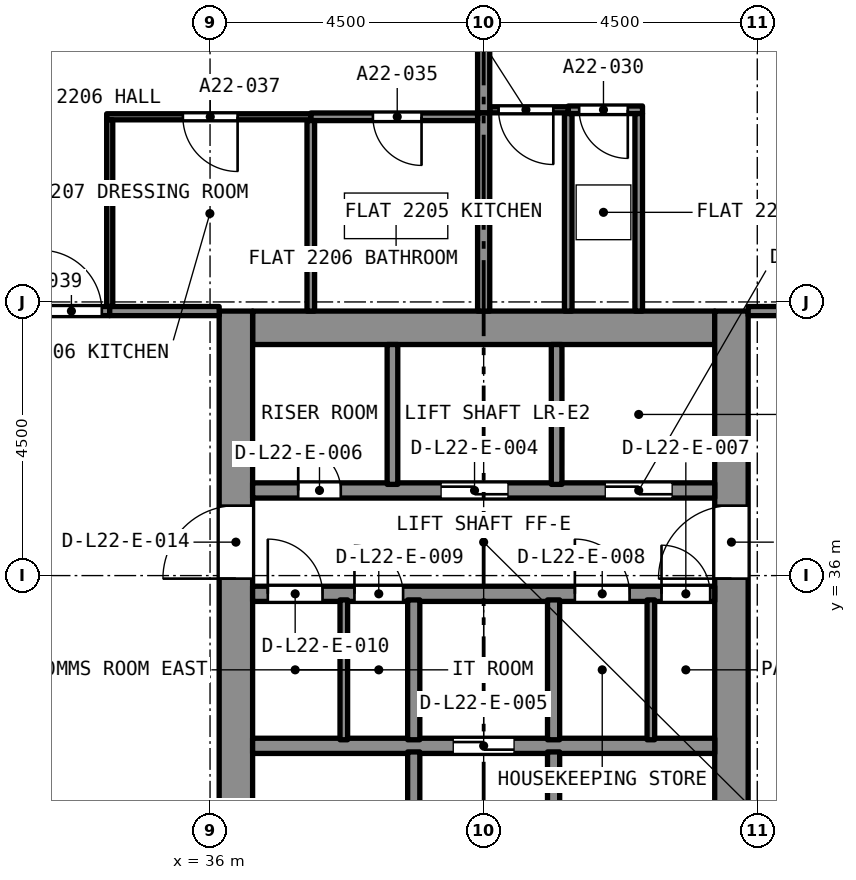
"""IFC4 building model, lengths in metres.
Left out: names, types, materials, properties, quantities, classifications, styles, units other than length and angle.
Written with IfcOpenShell. Run it as: python <this file> out.ifc"""

import sys

from ifc_helpers import new_model, si_unit, direction, frame, frame_2d, origin, place, context, subcontext, project, spatial, rectangle, extrude, element, fill, save


model = new_model("IFC4")
c1 = context("Model", 3, precision=1e-05, world=origin(), true_north=direction((0.0, 1.0)))
c2 = subcontext(c1, "Body", "Model", "MODEL_VIEW")
j1 = project(units=[si_unit("LENGTHUNIT", "METRE"), si_unit("PLANEANGLEUNIT", "RADIAN")], contexts=[c1])
p1 = place(None, origin())
s1 = spatial("IfcSite", under=j1, at=p1, CompositionType="ELEMENT")
p2 = place(p1, origin())
s2 = spatial("IfcBuilding", under=s1, at=p2, CompositionType="ELEMENT")
p3 = place(p2, frame((0.0, 0.0, 83.2)))
s3 = spatial("IfcBuildingStorey", under=s2, at=p3, CompositionType="ELEMENT", Elevation=83.2)
p4 = place(p3, frame((36.7, 40.075, 0.0), z_axis=(0.0, 0.0, 1.0), x_axis=(1.0, 0.0, 0.0)))
e1 = element("IfcWall", 1, at=p4, inside=s3, PredefinedType="SOLIDWALL", context=c2, shape_type="SweptSolid", body=[
    extrude(rectangle(XDim=7.6, YDim=0.55, at=frame_2d((3.8, 0.0))), origin(), (0.0, 0.0, 1.0), 3.2),
])
p5 = place(p3, frame((36.425, 27.15, 0.0), z_axis=(0.0, 0.0, 1.0), x_axis=(0.0, 1.0, 0.0)))
e2 = element("IfcWall", 2, at=p5, inside=s3, PredefinedType="SOLIDWALL", context=c2, shape_type="SweptSolid", body=[
    extrude(rectangle(XDim=13.2, YDim=0.55, at=frame_2d((6.6, 0.0))), origin(), (0.0, 0.0, 1.0), 3.2),
])
p6 = place(p5, frame((8.8, 0.0, 0.0)))
e3 = element("IfcOpeningElement", 3, at=p6, cuts=e2, PredefinedType="OPENING", context=c2, shape_type="SweptSolid", body=[
    extrude(rectangle(XDim=1.2, YDim=2.1, at=frame_2d((0.6, 1.05))), frame((0.0, 0.285, 0.0), z_axis=(0.0, -1.0, 0.0), x_axis=(1.0, 0.0, 0.0)), (0.0, 0.0, 1.0), 0.57),
])
p7 = place(p3, frame((44.575, 27.15, 0.0), z_axis=(0.0, 0.0, 1.0), x_axis=(0.0, 1.0, 0.0)))
e4 = element("IfcWall", 4, at=p7, inside=s3, PredefinedType="SOLIDWALL", context=c2, shape_type="SweptSolid", body=[
    extrude(rectangle(XDim=13.2, YDim=0.55, at=frame_2d((6.6, 0.0))), origin(), (0.0, 0.0, 1.0), 3.2),
])
p8 = place(p7, frame((8.8, 0.0, 0.0)))
e5 = element("IfcOpeningElement", 5, at=p8, cuts=e4, PredefinedType="OPENING", context=c2, shape_type="SweptSolid", body=[
    extrude(rectangle(XDim=1.2, YDim=2.1, at=frame_2d((0.6, 1.05))), frame((0.0, 0.285, 0.0), z_axis=(0.0, -1.0, 0.0), x_axis=(1.0, 0.0, 0.0)), (0.0, 0.0, 1.0), 0.57),
])
p9 = place(p3, frame((43.113, 43.66, 0.0), z_axis=(0.0, 0.0, 1.0), x_axis=(-1.0, 0.0, 0.0)))
e6 = element("IfcWall", 6, at=p9, inside=s3, PredefinedType="PARTITIONING", context=c2, shape_type="SweptSolid", body=[
    extrude(rectangle(XDim=1.222, YDim=0.125, at=frame_2d((0.611, 0.0))), origin(), (0.0, 0.0, 1.0), 2.9),
])
p10 = place(p9, frame((0.242, 0.0, 0.0)))
e7 = element("IfcOpeningElement", 7, at=p10, cuts=e6, PredefinedType="OPENING", context=c2, shape_type="SweptSolid", body=[
    extrude(rectangle(XDim=0.8, YDim=2.1, at=frame_2d((0.4, 1.05))), frame((0.0, 0.073, 0.0), z_axis=(0.0, -1.0, 0.0), x_axis=(1.0, 0.0, 0.0)), (0.0, 0.0, 1.0), 0.145),
])
for number, where, z_axis, x_axis in (
    (8, (43.05, 40.35, 0.0), (0.0, 0.0, 1.0), (0.0, 1.0, 0.0)),
    (9, (41.891, 40.35, 0.0), (0.0, 0.0, 1.0), (0.0, 1.0, 0.0)),
):
    element("IfcWall", number, at=place(p3, frame(where, z_axis=z_axis, x_axis=x_axis)), inside=s3, PredefinedType="PARTITIONING", context=c2, shape_type="SweptSolid", body=[
        extrude(rectangle(XDim=3.247, YDim=0.125, at=frame_2d((1.624, 0.0))), origin(), (0.0, 0.0, 1.0), 2.9),
    ])
p11 = place(p3, frame((41.891, 43.66, 0.0), z_axis=(0.0, 0.0, 1.0), x_axis=(-1.0, 0.0, 0.0)))
e10 = element("IfcWall", 10, at=p11, inside=s3, PredefinedType="PARTITIONING", context=c2, shape_type="SweptSolid", body=[
    extrude(rectangle(XDim=1.291, YDim=0.1, at=frame_2d((0.646, 0.0))), origin(), (0.0, 0.0, 1.0), 2.9),
])
p12 = place(p11, frame((0.246, 0.0, 0.0)))
e11 = element("IfcOpeningElement", 11, at=p12, cuts=e10, PredefinedType="OPENING", context=c2, shape_type="SweptSolid", body=[
    extrude(rectangle(XDim=0.9, YDim=2.1, at=frame_2d((0.45, 1.05))), frame((0.0, 0.06, 0.0), z_axis=(0.0, -1.0, 0.0), x_axis=(1.0, 0.0, 0.0)), (0.0, 0.0, 1.0), 0.12),
])
p13 = place(p3, frame((40.5, 43.61, 0.0), z_axis=(0.0, 0.0, 1.0), x_axis=(0.0, 1.0, 0.0)))
e12 = element("IfcWall", 12, at=p13, inside=s3, PredefinedType="PARTITIONING", context=c2, shape_type="SweptSolid", body=[
    extrude(rectangle(XDim=1.365, YDim=0.2, at=frame_2d((0.683, 0.0))), origin(), (0.0, 0.0, 1.0), 2.9),
])
p14 = place(p3, frame((44.85, 40.35, 0.0), z_axis=(0.0, 0.0, 1.0), x_axis=(1.0, 0.0, 0.0)))
e13 = element("IfcWall", 13, at=p14, inside=s3, PredefinedType="PARTITIONING", context=c2, shape_type="SweptSolid", body=[
    extrude(rectangle(XDim=4.075, YDim=0.15, at=frame_2d((2.038, 0.0))), origin(), (0.0, 0.0, 1.0), 2.9),
])
p15 = place(p14, frame((1.9, 0.0, 0.0)))
e14 = element("IfcOpeningElement", 14, at=p15, cuts=e13, PredefinedType="OPENING", context=c2, shape_type="SweptSolid", body=[
    extrude(rectangle(XDim=1.0, YDim=2.1, at=frame_2d((0.5, 1.05))), frame((0.0, 0.085, 0.0), z_axis=(0.0, -1.0, 0.0), x_axis=(1.0, 0.0, 0.0)), (0.0, 0.0, 1.0), 0.17),
])
p16 = place(p3, frame((40.5, 40.35, 0.0), z_axis=(0.0, 0.0, 1.0), x_axis=(0.0, 1.0, 0.0)))
e15 = element("IfcWall", 15, at=p16, inside=s3, PredefinedType="PARTITIONING", context=c2, shape_type="SweptSolid", body=[
    extrude(rectangle(XDim=3.257, YDim=0.2, at=frame_2d((1.629, 0.0))), origin(), (0.0, 0.0, 1.0), 2.9),
])
p17 = place(p3, frame((40.4, 43.545, 0.0), z_axis=(0.0, 0.0, 1.0), x_axis=(-1.0, 0.0, 0.0)))
e16 = element("IfcWall", 16, at=p17, inside=s3, PredefinedType="PARTITIONING", context=c2, shape_type="SweptSolid", body=[
    extrude(rectangle(XDim=2.743, YDim=0.125, at=frame_2d((1.372, 0.0))), origin(), (0.0, 0.0, 1.0), 2.9),
])
p18 = place(p17, frame((0.922, 0.0, 0.0)))
e17 = element("IfcOpeningElement", 17, at=p18, cuts=e16, PredefinedType="OPENING", context=c2, shape_type="SweptSolid", body=[
    extrude(rectangle(XDim=0.8, YDim=2.1, at=frame_2d((0.4, 1.05))), frame((0.0, 0.073, 0.0), z_axis=(0.0, -1.0, 0.0), x_axis=(1.0, 0.0, 0.0)), (0.0, 0.0, 1.0), 0.145),
])
p19 = place(p3, frame((37.657, 40.35, 0.0), z_axis=(0.0, 0.0, 1.0), x_axis=(0.0, 1.0, 0.0)))
e18 = element("IfcWall", 18, at=p19, inside=s3, PredefinedType="PARTITIONING", context=c2, shape_type="SweptSolid", body=[
    extrude(rectangle(XDim=3.132, YDim=0.125, at=frame_2d((1.566, 0.0))), origin(), (0.0, 0.0, 1.0), 2.9),
])
p20 = place(p3, frame((37.657, 43.545, 0.0), z_axis=(0.0, 0.0, 1.0), x_axis=(-1.0, 0.0, 0.0)))
e19 = element("IfcWall", 19, at=p20, inside=s3, PredefinedType="PARTITIONING", context=c2, shape_type="SweptSolid", body=[
    extrude(rectangle(XDim=3.357, YDim=0.1, at=frame_2d((1.678, 0.0))), origin(), (0.0, 0.0, 1.0), 2.9),
])
p21 = place(p20, frame((1.203, 0.0, 0.0)))
e20 = element("IfcOpeningElement", 20, at=p21, cuts=e19, PredefinedType="OPENING", context=c2, shape_type="SweptSolid", body=[
    extrude(rectangle(XDim=0.9, YDim=2.1, at=frame_2d((0.45, 1.05))), frame((0.0, 0.06, 0.0), z_axis=(0.0, -1.0, 0.0), x_axis=(1.0, 0.0, 0.0)), (0.0, 0.0, 1.0), 0.12),
])
p22 = place(p3, frame((34.35, 40.425, 0.0), z_axis=(0.0, 0.0, 1.0), x_axis=(0.0, 1.0, 0.0)))
e21 = element("IfcWall", 21, at=p22, inside=s3, PredefinedType="PARTITIONING", context=c2, shape_type="SweptSolid", body=[
    extrude(rectangle(XDim=3.07, YDim=0.1, at=frame_2d((1.535, 0.0))), origin(), (0.0, 0.0, 1.0), 2.9),
])
p23 = place(p3, frame((32.075, 40.35, 0.0), z_axis=(0.0, 0.0, 1.0), x_axis=(1.0, 0.0, 0.0)))
e22 = element("IfcWall", 22, at=p23, inside=s3, PredefinedType="PARTITIONING", context=c2, shape_type="SweptSolid", body=[
    extrude(rectangle(XDim=2.275, YDim=0.15, at=frame_2d((1.138, 0.0))), origin(), (0.0, 0.0, 1.0), 2.9),
])
p24 = place(p23, frame((1.145, 0.0, 0.0)))
e23 = element("IfcOpeningElement", 23, at=p24, cuts=e22, PredefinedType="OPENING", context=c2, shape_type="SweptSolid", body=[
    extrude(rectangle(XDim=1.0, YDim=2.1, at=frame_2d((0.5, 1.05))), frame((0.0, 0.085, 0.0), z_axis=(0.0, -1.0, 0.0), x_axis=(1.0, 0.0, 0.0)), (0.0, 0.0, 1.0), 0.17),
])
p25 = place(p3, frame((34.35, 40.35, 0.0), z_axis=(0.0, 0.0, 1.0), x_axis=(1.0, 0.0, 0.0)))
e24 = element("IfcWall", 24, at=p25, inside=s3, PredefinedType="PARTITIONING", context=c2, shape_type="SweptSolid", body=[
    extrude(rectangle(XDim=1.8, YDim=0.15, at=frame_2d((0.9, 0.0))), origin(), (0.0, 0.0, 1.0), 2.9),
])
p26 = place(p3, frame((36.7, 33.2, 0.0), z_axis=(0.0, 0.0, 1.0), x_axis=(1.0, 0.0, 0.0)))
e25 = element("IfcWall", 25, at=p26, inside=s3, PredefinedType="SOLIDWALL", context=c2, shape_type="SweptSolid", body=[
    extrude(rectangle(XDim=7.6, YDim=0.25, at=frame_2d((3.8, 0.0))), origin(), (0.0, 0.0, 1.0), 2.9),
])
p27 = place(p26, frame((3.3, 0.0, 0.0)))
e26 = element("IfcOpeningElement", 26, at=p27, cuts=e25, PredefinedType="OPENING", context=c2, shape_type="SweptSolid", body=[
    extrude(rectangle(XDim=1.0, YDim=2.1, at=frame_2d((0.5, 1.05))), frame((0.0, 0.135, 0.0), z_axis=(0.0, -1.0, 0.0), x_axis=(1.0, 0.0, 0.0)), (0.0, 0.0, 1.0), 0.27),
])
p28 = place(p3, frame((36.7, 35.7, 0.0), z_axis=(0.0, 0.0, 1.0), x_axis=(1.0, 0.0, 0.0)))
e27 = element("IfcWall", 27, at=p28, inside=s3, PredefinedType="SOLIDWALL", context=c2, shape_type="SweptSolid", body=[
    extrude(rectangle(XDim=7.6, YDim=0.25, at=frame_2d((3.8, 0.0))), origin(), (0.0, 0.0, 1.0), 2.9),
])
p29 = place(p28, frame((6.725, 0.0, 0.0)))
e28 = element("IfcOpeningElement", 28, at=p29, cuts=e27, PredefinedType="OPENING", context=c2, shape_type="SweptSolid", body=[
    extrude(rectangle(XDim=0.8, YDim=2.1, at=frame_2d((0.4, 1.05))), frame((0.0, 0.135, 0.0), z_axis=(0.0, -1.0, 0.0), x_axis=(1.0, 0.0, 0.0)), (0.0, 0.0, 1.0), 0.27),
])
p30 = place(p28, frame((5.3, 0.0, 0.0)))
e29 = element("IfcOpeningElement", 29, at=p30, cuts=e27, PredefinedType="OPENING", context=c2, shape_type="SweptSolid", body=[
    extrude(rectangle(XDim=0.9, YDim=2.1, at=frame_2d((0.45, 1.05))), frame((0.0, 0.135, 0.0), z_axis=(0.0, -1.0, 0.0), x_axis=(1.0, 0.0, 0.0)), (0.0, 0.0, 1.0), 0.27),
])
p31 = place(p28, frame((1.675, 0.0, 0.0)))
e30 = element("IfcOpeningElement", 30, at=p31, cuts=e27, PredefinedType="OPENING", context=c2, shape_type="SweptSolid", body=[
    extrude(rectangle(XDim=0.8, YDim=2.1, at=frame_2d((0.4, 1.05))), frame((0.0, 0.135, 0.0), z_axis=(0.0, -1.0, 0.0), x_axis=(1.0, 0.0, 0.0)), (0.0, 0.0, 1.0), 0.27),
])
p32 = place(p28, frame((0.25, 0.0, 0.0)))
e31 = element("IfcOpeningElement", 31, at=p32, cuts=e27, PredefinedType="OPENING", context=c2, shape_type="SweptSolid", body=[
    extrude(rectangle(XDim=0.9, YDim=2.1, at=frame_2d((0.45, 1.05))), frame((0.0, 0.135, 0.0), z_axis=(0.0, -1.0, 0.0), x_axis=(1.0, 0.0, 0.0)), (0.0, 0.0, 1.0), 0.27),
])
p33 = place(p3, frame((36.7, 37.4, 0.0), z_axis=(0.0, 0.0, 1.0), x_axis=(1.0, 0.0, 0.0)))
e32 = element("IfcWall", 32, at=p33, inside=s3, PredefinedType="SOLIDWALL", context=c2, shape_type="SweptSolid", body=[
    extrude(rectangle(XDim=7.6, YDim=0.25, at=frame_2d((3.8, 0.0))), origin(), (0.0, 0.0, 1.0), 2.9),
])
p34 = place(p33, frame((5.8, 0.0, 0.0)))
e33 = element("IfcOpeningElement", 33, at=p34, cuts=e32, PredefinedType="OPENING", context=c2, shape_type="SweptSolid", body=[
    extrude(rectangle(XDim=1.1, YDim=2.4, at=frame_2d((0.55, 1.2))), frame((0.0, 0.135, 0.0), z_axis=(0.0, -1.0, 0.0), x_axis=(1.0, 0.0, 0.0)), (0.0, 0.0, 1.0), 0.27),
])
p35 = place(p33, frame((3.1, 0.0, 0.0)))
e34 = element("IfcOpeningElement", 34, at=p35, cuts=e32, PredefinedType="OPENING", context=c2, shape_type="SweptSolid", body=[
    extrude(rectangle(XDim=1.1, YDim=2.4, at=frame_2d((0.55, 1.2))), frame((0.0, 0.135, 0.0), z_axis=(0.0, -1.0, 0.0), x_axis=(1.0, 0.0, 0.0)), (0.0, 0.0, 1.0), 0.27),
])
p36 = place(p33, frame((0.75, 0.0, 0.0)))
e35 = element("IfcOpeningElement", 35, at=p36, cuts=e32, PredefinedType="OPENING", context=c2, shape_type="SweptSolid", body=[
    extrude(rectangle(XDim=0.7, YDim=2.1, at=frame_2d((0.35, 1.05))), frame((0.0, 0.135, 0.0), z_axis=(0.0, -1.0, 0.0), x_axis=(1.0, 0.0, 0.0)), (0.0, 0.0, 1.0), 0.27),
])
p37 = place(p3, frame((41.65, 27.7, 0.0), z_axis=(0.0, 0.0, 1.0), x_axis=(0.0, 1.0, 0.0)))
e36 = element("IfcWall", 36, at=p37, inside=s3, PredefinedType="SOLIDWALL", context=c2, shape_type="SweptSolid", body=[
    extrude(rectangle(XDim=5.4, YDim=0.2, at=frame_2d((2.7, 0.0))), origin(), (0.0, 0.0, 1.0), 2.9),
])
p38 = place(p37, frame((0.2, 0.0, 0.0)))
e37 = element("IfcOpeningElement", 37, at=p38, cuts=e36, PredefinedType="OPENING", context=c2, shape_type="SweptSolid", body=[
    extrude(rectangle(XDim=0.9, YDim=2.1, at=frame_2d((0.45, 1.05))), frame((0.0, 0.11, 0.0), z_axis=(0.0, -1.0, 0.0), x_axis=(1.0, 0.0, 0.0)), (0.0, 0.0, 1.0), 0.22),
])
p39 = place(p3, frame((39.35, 27.7, 0.0), z_axis=(0.0, 0.0, 1.0), x_axis=(0.0, 1.0, 0.0)))
e38 = element("IfcWall", 38, at=p39, inside=s3, PredefinedType="SOLIDWALL", context=c2, shape_type="SweptSolid", body=[
    extrude(rectangle(XDim=5.4, YDim=0.2, at=frame_2d((2.7, 0.0))), origin(), (0.0, 0.0, 1.0), 2.9),
])
p40 = place(p39, frame((0.2, 0.0, 0.0)))
e39 = element("IfcOpeningElement", 39, at=p40, cuts=e38, PredefinedType="OPENING", context=c2, shape_type="SweptSolid", body=[
    extrude(rectangle(XDim=0.9, YDim=2.1, at=frame_2d((0.45, 1.05))), frame((0.0, 0.11, 0.0), z_axis=(0.0, -1.0, 0.0), x_axis=(1.0, 0.0, 0.0)), (0.0, 0.0, 1.0), 0.22),
])
for number, where, z_axis, x_axis in (
    (40, (41.65, 33.3, 0.0), (0.0, 0.0, 1.0), (0.0, 1.0, 0.0)),
    (41, (39.35, 33.3, 0.0), (0.0, 0.0, 1.0), (0.0, 1.0, 0.0)),
):
    element("IfcWall", number, at=place(p3, frame(where, z_axis=z_axis, x_axis=x_axis)), inside=s3, PredefinedType="SOLIDWALL", context=c2, shape_type="SweptSolid", body=[
        extrude(rectangle(XDim=2.3, YDim=0.2, at=frame_2d((1.15, 0.0))), origin(), (0.0, 0.0, 1.0), 2.9),
    ])
for number, where, z_axis, x_axis in (
    (42, (41.7, 37.5, 0.0), (0.0, 0.0, 1.0), (0.0, 1.0, 0.0)),
    (43, (39.0, 37.5, 0.0), (0.0, 0.0, 1.0), (0.0, 1.0, 0.0)),
):
    element("IfcWall", number, at=place(p3, frame(where, z_axis=z_axis, x_axis=x_axis)), inside=s3, PredefinedType="SOLIDWALL", context=c2, shape_type="SweptSolid", body=[
        extrude(rectangle(XDim=2.3, YDim=0.175, at=frame_2d((1.15, 0.0))), origin(), (0.0, 0.0, 1.0), 2.9),
    ])
for number, where, z_axis, x_axis in (
    (44, (43.25, 33.3, 0.0), (0.0, 0.0, 1.0), (0.0, 1.0, 0.0)),
    (45, (38.2, 33.3, 0.0), (0.0, 0.0, 1.0), (0.0, 1.0, 0.0)),
):
    element("IfcWall", number, at=place(p3, frame(where, z_axis=z_axis, x_axis=x_axis)), inside=s3, PredefinedType="PARTITIONING", context=c2, shape_type="SweptSolid", body=[
        extrude(rectangle(XDim=2.3, YDim=0.125, at=frame_2d((1.15, 0.0))), origin(), (0.0, 0.0, 1.0), 2.9),
    ])
p41 = place(p10, origin())
e46 = element("IfcDoor", 46, at=p41, inside=s3, OperationType="SINGLE_SWING_RIGHT", PredefinedType="DOOR", context=c2, shape_type="SweptSolid", body=[
    extrude(rectangle(XDim=0.8, YDim=2.1, at=frame_2d((0.4, 1.05))), frame((0.0, 0.025, 0.0), z_axis=(0.0, -1.0, 0.0), x_axis=(1.0, 0.0, 0.0)), (0.0, 0.0, 1.0), 0.05),
])
fill(e7, e46)
p42 = place(p12, origin())
e47 = element("IfcDoor", 47, at=p42, inside=s3, OperationType="SINGLE_SWING_RIGHT", PredefinedType="DOOR", context=c2, shape_type="SweptSolid", body=[
    extrude(rectangle(XDim=0.9, YDim=2.1, at=frame_2d((0.45, 1.05))), frame((0.0, 0.025, 0.0), z_axis=(0.0, -1.0, 0.0), x_axis=(1.0, 0.0, 0.0)), (0.0, 0.0, 1.0), 0.05),
])
fill(e11, e47)
p43 = place(p18, origin())
e48 = element("IfcDoor", 48, at=p43, inside=s3, OperationType="SINGLE_SWING_LEFT", PredefinedType="DOOR", context=c2, shape_type="SweptSolid", body=[
    extrude(rectangle(XDim=0.8, YDim=2.1, at=frame_2d((0.4, 1.05))), frame((0.0, 0.025, 0.0), z_axis=(0.0, -1.0, 0.0), x_axis=(1.0, 0.0, 0.0)), (0.0, 0.0, 1.0), 0.05),
])
fill(e17, e48)
p44 = place(p21, origin())
e49 = element("IfcDoor", 49, at=p44, inside=s3, OperationType="SINGLE_SWING_LEFT", PredefinedType="DOOR", context=c2, shape_type="SweptSolid", body=[
    extrude(rectangle(XDim=0.9, YDim=2.1, at=frame_2d((0.45, 1.05))), frame((0.0, 0.025, 0.0), z_axis=(0.0, -1.0, 0.0), x_axis=(1.0, 0.0, 0.0)), (0.0, 0.0, 1.0), 0.05),
])
fill(e20, e49)
p45 = place(p24, origin())
e50 = element("IfcDoor", 50, at=p45, inside=s3, OperationType="SINGLE_SWING_RIGHT", PredefinedType="DOOR", context=c2, shape_type="SweptSolid", body=[
    extrude(rectangle(XDim=1.0, YDim=2.1, at=frame_2d((0.5, 1.05))), frame((0.0, 0.025, 0.0), z_axis=(0.0, -1.0, 0.0), x_axis=(1.0, 0.0, 0.0)), (0.0, 0.0, 1.0), 0.05),
])
fill(e23, e50)
p46 = place(p34, origin())
e51 = element("IfcDoor", 51, at=p46, inside=s3, OperationType="SLIDING_TO_LEFT", PredefinedType="DOOR", context=c2, shape_type="SweptSolid", body=[
    extrude(rectangle(XDim=1.1, YDim=2.4, at=frame_2d((0.55, 1.2))), frame((0.0, 0.025, 0.0), z_axis=(0.0, -1.0, 0.0), x_axis=(1.0, 0.0, 0.0)), (0.0, 0.0, 1.0), 0.05),
])
fill(e33, e51)
p47 = place(p35, origin())
e52 = element("IfcDoor", 52, at=p47, inside=s3, OperationType="SLIDING_TO_LEFT", PredefinedType="DOOR", context=c2, shape_type="SweptSolid", body=[
    extrude(rectangle(XDim=1.1, YDim=2.4, at=frame_2d((0.55, 1.2))), frame((0.0, 0.025, 0.0), z_axis=(0.0, -1.0, 0.0), x_axis=(1.0, 0.0, 0.0)), (0.0, 0.0, 1.0), 0.05),
])
fill(e34, e52)
p48 = place(p27, origin())
e53 = element("IfcDoor", 53, at=p48, inside=s3, OperationType="SLIDING_TO_LEFT", PredefinedType="DOOR", context=c2, shape_type="SweptSolid", body=[
    extrude(rectangle(XDim=1.0, YDim=2.1, at=frame_2d((0.5, 1.05))), frame((0.0, 0.025, 0.0), z_axis=(0.0, -1.0, 0.0), x_axis=(1.0, 0.0, 0.0)), (0.0, 0.0, 1.0), 0.05),
])
fill(e26, e53)
p49 = place(p36, origin())
e54 = element("IfcDoor", 54, at=p49, inside=s3, OperationType="SINGLE_SWING_LEFT", PredefinedType="DOOR", context=c2, shape_type="SweptSolid", body=[
    extrude(rectangle(XDim=0.7, YDim=2.1, at=frame_2d((0.35, 1.05))), frame((0.0, 0.025, 0.0), z_axis=(0.0, -1.0, 0.0), x_axis=(1.0, 0.0, 0.0)), (0.0, 0.0, 1.0), 0.05),
])
fill(e35, e54)
p50 = place(p29, origin())
e55 = element("IfcDoor", 55, at=p50, inside=s3, OperationType="SINGLE_SWING_LEFT", PredefinedType="DOOR", context=c2, shape_type="SweptSolid", body=[
    extrude(rectangle(XDim=0.8, YDim=2.1, at=frame_2d((0.4, 1.05))), frame((0.0, 0.025, 0.0), z_axis=(0.0, -1.0, 0.0), x_axis=(1.0, 0.0, 0.0)), (0.0, 0.0, 1.0), 0.05),
])
fill(e28, e55)
p51 = place(p30, origin())
e56 = element("IfcDoor", 56, at=p51, inside=s3, OperationType="SINGLE_SWING_LEFT", PredefinedType="DOOR", context=c2, shape_type="SweptSolid", body=[
    extrude(rectangle(XDim=0.9, YDim=2.1, at=frame_2d((0.45, 1.05))), frame((0.0, 0.025, 0.0), z_axis=(0.0, -1.0, 0.0), x_axis=(1.0, 0.0, 0.0)), (0.0, 0.0, 1.0), 0.05),
])
fill(e29, e56)
p52 = place(p31, origin())
e57 = element("IfcDoor", 57, at=p52, inside=s3, OperationType="SINGLE_SWING_LEFT", PredefinedType="DOOR", context=c2, shape_type="SweptSolid", body=[
    extrude(rectangle(XDim=0.8, YDim=2.1, at=frame_2d((0.4, 1.05))), frame((0.0, 0.025, 0.0), z_axis=(0.0, -1.0, 0.0), x_axis=(1.0, 0.0, 0.0)), (0.0, 0.0, 1.0), 0.05),
])
fill(e30, e57)
p53 = place(p32, origin())
e58 = element("IfcDoor", 58, at=p53, inside=s3, OperationType="SINGLE_SWING_LEFT", PredefinedType="DOOR", context=c2, shape_type="SweptSolid", body=[
    extrude(rectangle(XDim=0.9, YDim=2.1, at=frame_2d((0.45, 1.05))), frame((0.0, 0.025, 0.0), z_axis=(0.0, -1.0, 0.0), x_axis=(1.0, 0.0, 0.0)), (0.0, 0.0, 1.0), 0.05),
])
fill(e31, e58)
p54 = place(p6, origin())
e59 = element("IfcDoor", 59, at=p54, inside=s3, OperationType="SINGLE_SWING_LEFT", PredefinedType="DOOR", context=c2, shape_type="SweptSolid", body=[
    extrude(rectangle(XDim=1.2, YDim=2.1, at=frame_2d((0.6, 1.05))), frame((0.0, 0.025, 0.0), z_axis=(0.0, -1.0, 0.0), x_axis=(1.0, 0.0, 0.0)), (0.0, 0.0, 1.0), 0.05),
])
fill(e3, e59)
p55 = place(p8, origin())
e60 = element("IfcDoor", 60, at=p55, inside=s3, OperationType="SINGLE_SWING_LEFT", PredefinedType="DOOR", context=c2, shape_type="SweptSolid", body=[
    extrude(rectangle(XDim=1.2, YDim=2.1, at=frame_2d((0.6, 1.05))), frame((0.0, 0.025, 0.0), z_axis=(0.0, -1.0, 0.0), x_axis=(1.0, 0.0, 0.0)), (0.0, 0.0, 1.0), 0.05),
])
fill(e5, e60)
save(model, sys.argv[1])
